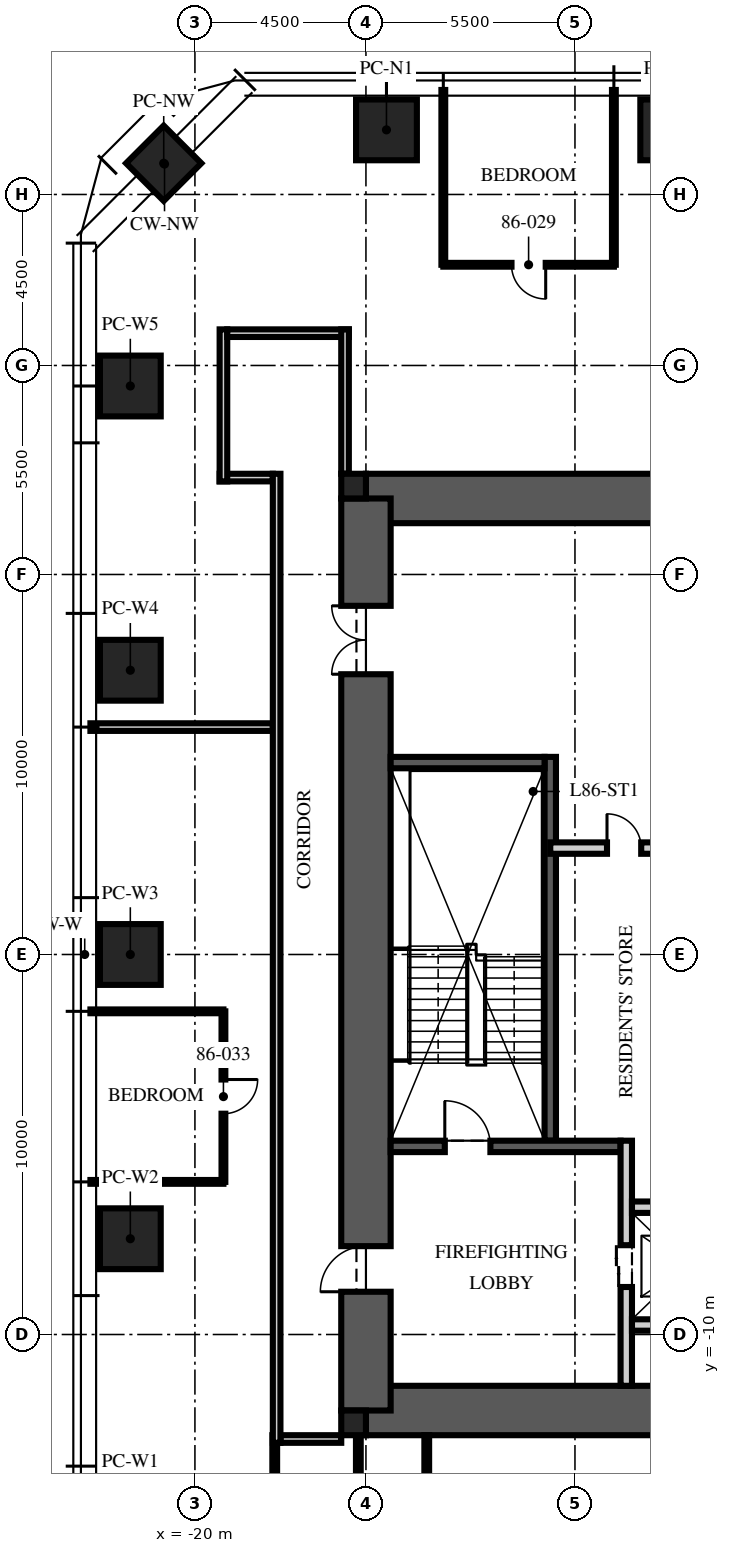
"""IFC4 building model, lengths in metres.
Left out: names, types, materials, properties, quantities, classifications, styles, units other than length and angle.
Written with IfcOpenShell. Run it as: python <this file> out.ifc"""

import sys

from ifc_helpers import new_model, si_unit, direction, frame, frame_2d, origin, origin_2d, place, context, subcontext, project, spatial, rectangle, extrude, element, fill, save


model = new_model("IFC4")
c1 = context("Model", 3, precision=1e-05, world=origin(), true_north=direction((0.0, 1.0)))
c2 = subcontext(c1, "Body", "Model", "MODEL_VIEW")
j1 = project(units=[si_unit("LENGTHUNIT", "METRE"), si_unit("PLANEANGLEUNIT", "RADIAN")], contexts=[c1])
p1 = place(None, origin())
s1 = spatial("IfcSite", under=j1, at=p1, CompositionType="ELEMENT")
p2 = place(p1, origin())
s2 = spatial("IfcBuilding", under=s1, at=p2, CompositionType="ELEMENT")
p3 = place(p2, frame((0.0, 0.0, 342.0)))
s3 = spatial("IfcBuildingStorey", under=s2, at=p3, CompositionType="ELEMENT", Elevation=342.0)
for number, where, z_axis, x_axis in (
    (1, (-15.5, 12.0, -0.25), (0.0, 0.0, 1.0), (1.0, 0.0, 0.0)),
    (2, (-15.5, -12.0, -0.25), (0.0, 0.0, 1.0), (1.0, 0.0, 0.0)),
):
    element("IfcWall", number, at=place(p3, frame(where, z_axis=z_axis, x_axis=x_axis)), inside=s3, PredefinedType="SHEAR", context=c2, shape_type="SweptSolid", body=[
        extrude(rectangle(XDim=31.0, YDim=1.3, at=frame_2d((15.5, 0.0))), origin(), (0.0, 0.0, 1.0), 3.75),
    ])
p4 = place(p3, frame((-15.5, -12.0, -0.25), z_axis=(0.0, 0.0, 1.0), x_axis=(0.0, 1.0, 0.0)))
e3 = element("IfcWall", 3, at=p4, inside=s3, PredefinedType="SHEAR", context=c2, shape_type="SweptSolid", body=[
    extrude(rectangle(XDim=24.0, YDim=1.3, at=frame_2d((12.0, 0.0))), origin(), (0.0, 0.0, 1.0), 3.75),
])
p5 = place(p4, frame((3.125, 0.0, 0.25)))
e4 = element("IfcOpeningElement", 4, at=p5, cuts=e3, PredefinedType="OPENING", context=c2, shape_type="SweptSolid", body=[
    extrude(rectangle(XDim=1.2, YDim=2.1, at=frame_2d((0.6, 1.05))), frame((0.0, 0.66, 0.0), z_axis=(0.0, -1.0, 0.0), x_axis=(1.0, 0.0, 0.0)), (0.0, 0.0, 1.0), 1.32),
])
p6 = place(p4, frame((19.375, 0.0, 0.25)))
e5 = element("IfcOpeningElement", 5, at=p6, cuts=e3, PredefinedType="OPENING", context=c2, shape_type="SweptSolid", body=[
    extrude(rectangle(XDim=1.8, YDim=2.1, at=frame_2d((0.9, 1.05))), frame((0.0, 0.66, 0.0), z_axis=(0.0, -1.0, 0.0), x_axis=(1.0, 0.0, 0.0)), (0.0, 0.0, 1.0), 1.32),
])
for number, where, z_axis, x_axis in (
    (6, (-15.825, 12.325, -0.25), (0.0, 0.0, 1.0), (1.0, 0.0, 0.0)),
    (7, (-15.825, -12.325, -0.25), (0.0, 0.0, 1.0), (1.0, 0.0, 0.0)),
):
    element("IfcColumn", number, at=place(p3, frame(where, z_axis=z_axis, x_axis=x_axis)), inside=s3, PredefinedType="COLUMN", context=c2, shape_type="SweptSolid", body=[
        extrude(rectangle(XDim=0.65, YDim=0.65, at=origin_2d()), origin(), (0.0, 0.0, 1.0), 3.75),
    ])
for number, where, z_axis, x_axis in (
    (8, (-14.96, 21.7, 0.0), (0.0, 0.0, 1.0), (1.0, 0.0, 0.0)),
    (9, (-7.48, 21.7, 0.0), (0.0, 0.0, 1.0), (1.0, 0.0, 0.0)),
    (10, (-21.7, -7.48, 0.0), (0.0, 0.0, 1.0), (0.0, 1.0, 0.0)),
    (11, (-21.7, 0.0, 0.0), (0.0, 0.0, 1.0), (0.0, 1.0, 0.0)),
    (12, (-21.7, 7.48, 0.0), (0.0, 0.0, 1.0), (0.0, 1.0, 0.0)),
    (13, (-21.7, 14.96, 0.0), (0.0, 0.0, 1.0), (0.0, 1.0, 0.0)),
):
    element("IfcColumn", number, at=place(p3, frame(where, z_axis=z_axis, x_axis=x_axis)), inside=s3, PredefinedType="COLUMN", context=c2, shape_type="SweptSolid", body=[
        extrude(rectangle(XDim=1.6, YDim=1.6, at=origin_2d()), origin(), (0.0, 0.0, 1.0), 3.75),
    ])
p7 = place(p3, frame((-20.821, 20.821, 0.0), z_axis=(0.0, 0.0, 1.0), x_axis=(0.707106781187, 0.707106781187, 0.0)))
e14 = element("IfcColumn", 14, at=p7, inside=s3, PredefinedType="COLUMN", context=c2, shape_type="SweptSolid", body=[
    extrude(rectangle(XDim=1.4, YDim=1.4, at=origin_2d()), origin(), (0.0, 0.0, 1.0), 3.75),
])
p8 = place(p3, frame((-10.65, -4.9, 0.0), z_axis=(0.0, 0.0, 1.0), x_axis=(0.0, 1.0, 0.0)))
e15 = element("IfcWall", 15, at=p8, inside=s3, PredefinedType="SOLIDWALL", context=c2, shape_type="SweptSolid", body=[
    extrude(rectangle(XDim=10.1, YDim=0.3, at=frame_2d((5.05, 0.0))), origin(), (0.0, 0.0, 1.0), 3.5),
])
p9 = place(p3, frame((-14.85, -5.05, 0.0), z_axis=(0.0, 0.0, 1.0), x_axis=(1.0, 0.0, 0.0)))
e16 = element("IfcWall", 16, at=p9, inside=s3, PredefinedType="SOLIDWALL", context=c2, shape_type="SweptSolid", body=[
    extrude(rectangle(XDim=6.05, YDim=0.3, at=frame_2d((3.025, 0.0))), origin(), (0.0, 0.0, 1.0), 3.5),
])
p10 = place(p9, frame((1.425, 0.0, 0.0)))
e17 = element("IfcOpeningElement", 17, at=p10, cuts=e16, PredefinedType="OPENING", context=c2, shape_type="SweptSolid", body=[
    extrude(rectangle(XDim=1.2, YDim=2.1, at=frame_2d((0.6, 1.05))), frame((0.0, 0.16, 0.0), z_axis=(0.0, -1.0, 0.0), x_axis=(1.0, 0.0, 0.0)), (0.0, 0.0, 1.0), 0.32),
])
p11 = place(p3, frame((-14.85, 5.05, 0.0), z_axis=(0.0, 0.0, 1.0), x_axis=(1.0, 0.0, 0.0)))
e18 = element("IfcWall", 18, at=p11, inside=s3, PredefinedType="SOLIDWALL", context=c2, shape_type="SweptSolid", body=[
    extrude(rectangle(XDim=4.05, YDim=0.3, at=frame_2d((2.025, 0.0))), origin(), (0.0, 0.0, 1.0), 3.5),
])
p12 = place(p3, frame((-8.65, -11.35, 0.0), z_axis=(0.0, 0.0, 1.0), x_axis=(0.0, 1.0, 0.0)))
e19 = element("IfcWall", 19, at=p12, inside=s3, PredefinedType="PARTITIONING", context=c2, shape_type="SweptSolid", body=[
    extrude(rectangle(XDim=6.45, YDim=0.3, at=frame_2d((3.225, 0.0))), origin(), (0.0, 0.0, 1.0), 3.5),
])
p13 = place(p12, frame((2.6, 0.0, 0.0)))
e20 = element("IfcOpeningElement", 20, at=p13, cuts=e19, PredefinedType="OPENING", context=c2, shape_type="SweptSolid", body=[
    extrude(rectangle(XDim=1.1, YDim=2.1, at=frame_2d((0.55, 1.05))), frame((0.0, 0.16, 0.0), z_axis=(0.0, -1.0, 0.0), x_axis=(1.0, 0.0, 0.0)), (0.0, 0.0, 1.0), 0.32),
])
p14 = place(p3, frame((-8.5, -6.65, 0.0), z_axis=(0.0, 0.0, 1.0), x_axis=(1.0, 0.0, 0.0)))
e21 = element("IfcWall", 21, at=p14, inside=s3, PredefinedType="PARTITIONING", context=c2, shape_type="SweptSolid", body=[
    extrude(rectangle(XDim=17.0, YDim=0.3, at=frame_2d((8.5, 0.0))), origin(), (0.0, 0.0, 1.0), 3.5),
])
p15 = place(p14, frame((7.8, 0.0, 0.0)))
e22 = element("IfcOpeningElement", 22, at=p15, cuts=e21, PredefinedType="OPENING", context=c2, shape_type="SweptSolid", body=[
    extrude(rectangle(XDim=1.3, YDim=2.4, at=frame_2d((0.65, 1.2))), frame((0.0, 0.16, 0.0), z_axis=(0.0, -1.0, 0.0), x_axis=(1.0, 0.0, 0.0)), (0.0, 0.0, 1.0), 0.32),
])
p16 = place(p14, frame((5.65, 0.0, 0.0)))
e23 = element("IfcOpeningElement", 23, at=p16, cuts=e21, PredefinedType="OPENING", context=c2, shape_type="SweptSolid", body=[
    extrude(rectangle(XDim=0.9, YDim=2.1, at=frame_2d((0.45, 1.05))), frame((0.0, 0.16, 0.0), z_axis=(0.0, -1.0, 0.0), x_axis=(1.0, 0.0, 0.0)), (0.0, 0.0, 1.0), 0.32),
])
p17 = place(p14, frame((10.4, 0.0, 0.0)))
e24 = element("IfcOpeningElement", 24, at=p17, cuts=e21, PredefinedType="OPENING", context=c2, shape_type="SweptSolid", body=[
    extrude(rectangle(XDim=0.9, YDim=2.1, at=frame_2d((0.45, 1.05))), frame((0.0, 0.16, 0.0), z_axis=(0.0, -1.0, 0.0), x_axis=(1.0, 0.0, 0.0)), (0.0, 0.0, 1.0), 0.32),
])
p18 = place(p3, frame((-8.5, -9.75, 0.0), z_axis=(0.0, 0.0, 1.0), x_axis=(1.0, 0.0, 0.0)))
e25 = element("IfcWall", 25, at=p18, inside=s3, PredefinedType="PARTITIONING", context=c2, shape_type="SweptSolid", body=[
    extrude(rectangle(XDim=2.9, YDim=0.3, at=frame_2d((1.45, 0.0))), origin(), (0.0, 0.0, 1.0), 3.5),
])
p19 = place(p3, frame((-10.65, 2.8, 0.0), z_axis=(0.0, 0.0, 1.0), x_axis=(1.0, 0.0, 0.0)))
e26 = element("IfcWall", 26, at=p19, inside=s3, PredefinedType="PARTITIONING", context=c2, shape_type="SweptSolid", body=[
    extrude(rectangle(XDim=21.3, YDim=0.3, at=frame_2d((10.65, 0.0))), origin(), (0.0, 0.0, 1.0), 3.5),
])
p20 = place(p19, frame((10.05, 0.0, 0.0)))
e27 = element("IfcOpeningElement", 27, at=p20, cuts=e26, PredefinedType="OPENING", context=c2, shape_type="SweptSolid", body=[
    extrude(rectangle(XDim=1.2, YDim=2.1, at=frame_2d((0.6, 1.05))), frame((0.0, 0.16, 0.0), z_axis=(0.0, -1.0, 0.0), x_axis=(1.0, 0.0, 0.0)), (0.0, 0.0, 1.0), 0.32),
])
p21 = place(p19, frame((1.493, 0.0, 0.0)))
e28 = element("IfcOpeningElement", 28, at=p21, cuts=e26, PredefinedType="OPENING", context=c2, shape_type="SweptSolid", body=[
    extrude(rectangle(XDim=0.9, YDim=2.1, at=frame_2d((0.45, 1.05))), frame((0.0, 0.16, 0.0), z_axis=(0.0, -1.0, 0.0), x_axis=(1.0, 0.0, 0.0)), (0.0, 0.0, 1.0), 0.32),
])
p22 = place(p19, frame((18.836, 0.0, 0.0)))
e29 = element("IfcOpeningElement", 29, at=p22, cuts=e26, PredefinedType="OPENING", context=c2, shape_type="SweptSolid", body=[
    extrude(rectangle(XDim=0.9, YDim=2.1, at=frame_2d((0.45, 1.05))), frame((0.0, 0.16, 0.0), z_axis=(0.0, -1.0, 0.0), x_axis=(1.0, 0.0, 0.0)), (0.0, 0.0, 1.0), 0.32),
])
p23 = place(p3, frame((-17.95, 12.55, 0.0), z_axis=(0.0, 0.0, 1.0), x_axis=(-1.0, 0.0, 0.0)))
e30 = element("IfcWall", 30, at=p23, inside=s3, PredefinedType="PARTITIONING", context=c2, shape_type="SweptSolid", body=[
    extrude(rectangle(XDim=1.4, YDim=0.2, at=frame_2d((0.7, 0.0))), origin(), (0.0, 0.0, 1.0), 3.5),
])
p24 = place(p3, frame((-19.25, 12.45, 0.0), z_axis=(0.0, 0.0, 1.0), x_axis=(0.0, 1.0, 0.0)))
e31 = element("IfcWall", 31, at=p24, inside=s3, PredefinedType="PARTITIONING", context=c2, shape_type="SweptSolid", body=[
    extrude(rectangle(XDim=4.0, YDim=0.2, at=frame_2d((2.0, 0.0))), origin(), (0.0, 0.0, 1.0), 2.9),
])
p25 = place(p3, frame((-19.15, 16.35, 0.0), z_axis=(0.0, 0.0, 1.0), x_axis=(1.0, 0.0, 0.0)))
e32 = element("IfcWall", 32, at=p25, inside=s3, PredefinedType="PARTITIONING", context=c2, shape_type="SweptSolid", body=[
    extrude(rectangle(XDim=3.2, YDim=0.2, at=frame_2d((1.6, 0.0))), origin(), (0.0, 0.0, 1.0), 2.6),
])
p26 = place(p3, frame((-16.05, 16.45, 0.0), z_axis=(0.0, 0.0, 1.0), x_axis=(0.0, -1.0, 0.0)))
e33 = element("IfcWall", 33, at=p26, inside=s3, PredefinedType="PARTITIONING", context=c2, shape_type="SweptSolid", body=[
    extrude(rectangle(XDim=3.8, YDim=0.2, at=frame_2d((1.9, 0.0))), origin(), (0.0, 0.0, 1.0), 2.6),
])
p27 = place(p3, frame((-16.15, -12.75, 0.0), z_axis=(0.0, 0.0, 1.0), x_axis=(-1.0, 0.0, 0.0)))
e34 = element("IfcWall", 34, at=p27, inside=s3, PredefinedType="PARTITIONING", context=c2, shape_type="SweptSolid", body=[
    extrude(rectangle(XDim=1.6, YDim=0.2, at=frame_2d((0.8, 0.0))), origin(), (0.0, 0.0, 1.0), 2.6),
])
for number, where, z_axis, x_axis in (
    (35, (-8.976, 18.15, 0.0), (0.0, 0.0, 1.0), (0.0, 1.0, 0.0)),
    (36, (-13.464, 18.15, 0.0), (0.0, 0.0, 1.0), (0.0, 1.0, 0.0)),
):
    element("IfcWall", number, at=place(p3, frame(where, z_axis=z_axis, x_axis=x_axis)), inside=s3, PredefinedType="PARTITIONING", context=c2, shape_type="SweptSolid", body=[
        extrude(rectangle(XDim=4.6, YDim=0.1, at=frame_2d((2.3, 0.0))), origin(), (0.0, 0.0, 1.0), 3.01),
    ])
p28 = place(p3, frame((-17.95, 5.984, 0.0), z_axis=(0.0, 0.0, 1.0), x_axis=(-1.0, 0.0, 0.0)))
e37 = element("IfcWall", 37, at=p28, inside=s3, PredefinedType="PARTITIONING", context=c2, shape_type="SweptSolid", body=[
    extrude(rectangle(XDim=4.8, YDim=0.2, at=frame_2d((2.4, 0.0))), origin(), (0.0, 0.0, 1.0), 3.01),
])
for number, where, z_axis, x_axis in (
    (38, (-19.25, -1.496, 0.0), (0.0, 0.0, 1.0), (-1.0, 0.0, 0.0)),
    (39, (-19.25, -5.984, 0.0), (0.0, 0.0, 1.0), (-1.0, 0.0, 0.0)),
):
    element("IfcWall", number, at=place(p3, frame(where, z_axis=z_axis, x_axis=x_axis)), inside=s3, PredefinedType="PARTITIONING", context=c2, shape_type="SweptSolid", body=[
        extrude(rectangle(XDim=3.5, YDim=0.1, at=frame_2d((1.75, 0.0))), origin(), (0.0, 0.0, 1.0), 3.01),
    ])
p29 = place(p3, frame((-8.976, 18.15, 0.0), z_axis=(0.0, 0.0, 1.0), x_axis=(-1.0, 0.0, 0.0)))
e40 = element("IfcWall", 40, at=p29, inside=s3, PredefinedType="PARTITIONING", context=c2, shape_type="SweptSolid", body=[
    extrude(rectangle(XDim=4.488, YDim=0.1, at=frame_2d((2.244, 0.0))), origin(), (0.0, 0.0, 1.0), 2.91),
])
p30 = place(p29, frame((1.794, 0.0, 0.0)))
e41 = element("IfcOpeningElement", 41, at=p30, cuts=e40, PredefinedType="OPENING", context=c2, shape_type="SweptSolid", body=[
    extrude(rectangle(XDim=0.9, YDim=2.1, at=frame_2d((0.45, 1.05))), frame((0.0, 0.06, 0.0), z_axis=(0.0, -1.0, 0.0), x_axis=(1.0, 0.0, 0.0)), (0.0, 0.0, 1.0), 0.12),
])
p31 = place(p3, frame((-19.25, -1.496, 0.0), z_axis=(0.0, 0.0, 1.0), x_axis=(0.0, -1.0, 0.0)))
e42 = element("IfcWall", 42, at=p31, inside=s3, PredefinedType="PARTITIONING", context=c2, shape_type="SweptSolid", body=[
    extrude(rectangle(XDim=4.488, YDim=0.1, at=frame_2d((2.244, 0.0))), origin(), (0.0, 0.0, 1.0), 2.91),
])
p32 = place(p31, frame((1.794, 0.0, 0.0)))
e43 = element("IfcOpeningElement", 43, at=p32, cuts=e42, PredefinedType="OPENING", context=c2, shape_type="SweptSolid", body=[
    extrude(rectangle(XDim=0.9, YDim=2.1, at=frame_2d((0.45, 1.05))), frame((0.0, 0.06, 0.0), z_axis=(0.0, -1.0, 0.0), x_axis=(1.0, 0.0, 0.0)), (0.0, 0.0, 1.0), 0.12),
])
for number, where, z_axis, x_axis in (
    (44, (-17.9, -12.65, 0.0), (0.0, 0.0, 1.0), (0.0, -1.0, 0.0)),
    (45, (-15.7, -12.65, 0.0), (0.0, 0.0, 1.0), (0.0, -1.0, 0.0)),
):
    element("IfcWall", number, at=place(p3, frame(where, z_axis=z_axis, x_axis=x_axis)), inside=s3, PredefinedType="PARTITIONING", context=c2, shape_type="SweptSolid", body=[
        extrude(rectangle(XDim=3.346, YDim=0.125, at=frame_2d((1.673, 0.0))), origin(), (0.0, 0.0, 1.0), 2.6),
    ])
p33 = place(p3, frame((-13.9, -12.65, 0.0), z_axis=(0.0, 0.0, 1.0), x_axis=(0.0, -1.0, 0.0)))
e46 = element("IfcWall", 46, at=p33, inside=s3, PredefinedType="PARTITIONING", context=c2, shape_type="SweptSolid", body=[
    extrude(rectangle(XDim=3.346, YDim=0.125, at=frame_2d((1.673, 0.0))), origin(), (0.0, 0.0, 1.0), 3.5),
])
p34 = place(p3, frame((-17.85, 12.65, 0.0), z_axis=(0.0, 0.0, 1.0), x_axis=(0.0, -1.0, 0.0)))
e47 = element("IfcWall", 47, at=p34, inside=s3, PredefinedType="PARTITIONING", context=c2, shape_type="SweptSolid", body=[
    extrude(rectangle(XDim=25.5, YDim=0.2, at=frame_2d((12.75, 0.0))), origin(), (0.0, 0.0, 1.0), 2.9),
])
p35 = place(p10, origin())
e48 = element("IfcDoor", 48, at=p35, inside=s3, OperationType="SINGLE_SWING_LEFT", PredefinedType="DOOR", context=c2, shape_type="SweptSolid", body=[
    extrude(rectangle(XDim=1.2, YDim=2.1, at=frame_2d((0.6, 1.05))), frame((0.0, 0.025, 0.0), z_axis=(0.0, -1.0, 0.0), x_axis=(1.0, 0.0, 0.0)), (0.0, 0.0, 1.0), 0.05),
])
fill(e17, e48)
p36 = place(p5, origin())
e49 = element("IfcDoor", 49, at=p36, inside=s3, OperationType="SINGLE_SWING_LEFT", PredefinedType="DOOR", context=c2, shape_type="SweptSolid", body=[
    extrude(rectangle(XDim=1.2, YDim=2.1, at=frame_2d((0.6, 1.05))), frame((0.0, 0.025, 0.0), z_axis=(0.0, -1.0, 0.0), x_axis=(1.0, 0.0, 0.0)), (0.0, 0.0, 1.0), 0.05),
])
fill(e4, e49)
p37 = place(p6, origin())
e50 = element("IfcDoor", 50, at=p37, inside=s3, OperationType="DOUBLE_DOOR_SINGLE_SWING", PredefinedType="DOOR", context=c2, shape_type="SweptSolid", body=[
    extrude(rectangle(XDim=1.8, YDim=2.1, at=frame_2d((0.9, 1.05))), frame((0.0, 0.025, 0.0), z_axis=(0.0, -1.0, 0.0), x_axis=(1.0, 0.0, 0.0)), (0.0, 0.0, 1.0), 0.05),
])
fill(e5, e50)
p38 = place(p13, origin())
e51 = element("IfcDoor", 51, at=p38, inside=s3, OperationType="DOUBLE_DOOR_SLIDING", PredefinedType="DOOR", context=c2, shape_type="SweptSolid", body=[
    extrude(rectangle(XDim=1.1, YDim=2.1, at=frame_2d((0.55, 1.05))), frame((0.0, 0.025, 0.0), z_axis=(0.0, -1.0, 0.0), x_axis=(1.0, 0.0, 0.0)), (0.0, 0.0, 1.0), 0.05),
])
fill(e20, e51)
p39 = place(p21, origin())
e52 = element("IfcDoor", 52, at=p39, inside=s3, OperationType="SINGLE_SWING_LEFT", PredefinedType="DOOR", context=c2, shape_type="SweptSolid", body=[
    extrude(rectangle(XDim=0.9, YDim=2.1, at=frame_2d((0.45, 1.05))), frame((0.0, 0.025, 0.0), z_axis=(0.0, -1.0, 0.0), x_axis=(1.0, 0.0, 0.0)), (0.0, 0.0, 1.0), 0.05),
])
fill(e28, e52)
p40 = place(p30, origin())
e53 = element("IfcDoor", 53, at=p40, inside=s3, OperationType="SINGLE_SWING_LEFT", PredefinedType="DOOR", context=c2, shape_type="SweptSolid", body=[
    extrude(rectangle(XDim=0.9, YDim=2.1, at=frame_2d((0.45, 1.05))), frame((0.0, 0.025, 0.0), z_axis=(0.0, -1.0, 0.0), x_axis=(1.0, 0.0, 0.0)), (0.0, 0.0, 1.0), 0.05),
])
fill(e41, e53)
p41 = place(p32, origin())
e54 = element("IfcDoor", 54, at=p41, inside=s3, OperationType="SINGLE_SWING_LEFT", PredefinedType="DOOR", context=c2, shape_type="SweptSolid", body=[
    extrude(rectangle(XDim=0.9, YDim=2.1, at=frame_2d((0.45, 1.05))), frame((0.0, 0.025, 0.0), z_axis=(0.0, -1.0, 0.0), x_axis=(1.0, 0.0, 0.0)), (0.0, 0.0, 1.0), 0.05),
])
fill(e43, e54)
save(model, sys.argv[1])
